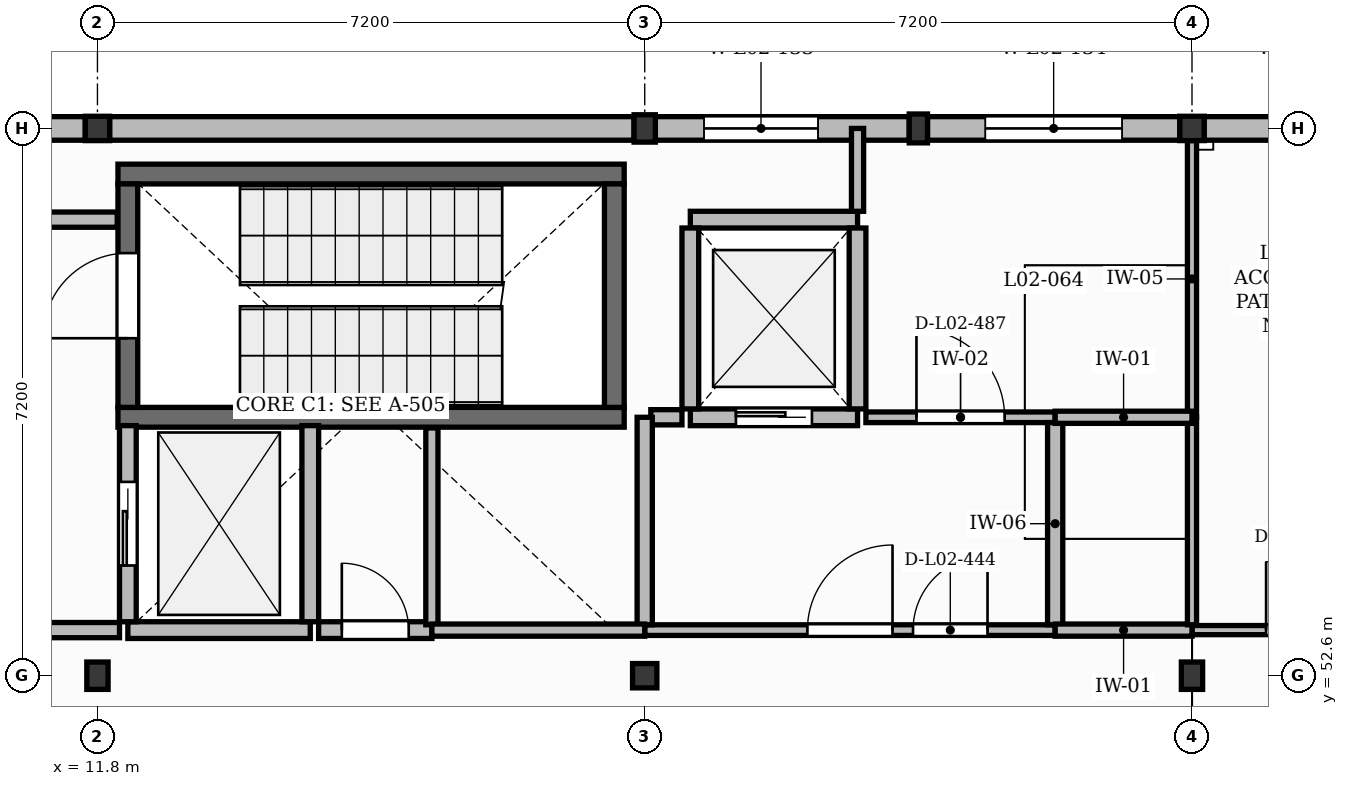
"""IFC4 building model, lengths in metres.
Left out: names, types, materials, properties, quantities, classifications, styles, units other than length and angle.
Written with IfcOpenShell. Run it as: python <this file> out.ifc"""

import sys

from ifc_helpers import new_model, si_unit, direction, frame, frame_2d, origin, origin_2d, place, context, subcontext, project, spatial, rectangle, extrude, element, fill, save


model = new_model("IFC4")
c1 = context("Model", 3, precision=1e-05, world=origin(), true_north=direction((0.0, 1.0)))
c2 = subcontext(c1, "Body", "Model", "MODEL_VIEW")
j1 = project(units=[si_unit("LENGTHUNIT", "METRE"), si_unit("PLANEANGLEUNIT", "RADIAN")], contexts=[c1])
p1 = place(None, origin())
s1 = spatial("IfcSite", under=j1, at=p1, CompositionType="ELEMENT")
p2 = place(p1, origin())
s2 = spatial("IfcBuilding", under=s1, at=p2, CompositionType="ELEMENT")
p3 = place(p2, frame((0.0, 0.0, 9.0)))
s3 = spatial("IfcBuildingStorey", under=s2, at=p3, CompositionType="ELEMENT", Elevation=9.0)
p4 = place(p3, frame((11.8, 52.6, 0.0), z_axis=(0.0, 0.0, 1.0), x_axis=(1.0, 0.0, 0.0)))
e1 = element("IfcColumn", 1, at=p4, inside=s3, PredefinedType="COLUMN", context=c2, shape_type="SweptSolid", body=[
    extrude(rectangle(XDim=0.28, YDim=0.36, at=origin_2d()), origin(), (0.0, 0.0, 1.0), 3.99),
])
for number, where, z_axis, x_axis in (
    (2, (11.8, 59.8, 0.0), (0.0, 0.0, 1.0), (1.0, 0.0, 0.0)),
    (3, (19.0, 52.6, 0.0), (0.0, 0.0, 1.0), (1.0, 0.0, 0.0)),
):
    element("IfcColumn", number, at=place(p3, frame(where, z_axis=z_axis, x_axis=x_axis)), inside=s3, PredefinedType="COLUMN", context=c2, shape_type="SweptSolid", body=[
        extrude(rectangle(XDim=0.32, YDim=0.32, at=origin_2d()), origin(), (0.0, 0.0, 1.0), 3.99),
    ])
for number, where, z_axis, x_axis in (
    (4, (19.0, 59.8, 0.0), (0.0, 0.0, 1.0), (1.0, 0.0, 0.0)),
    (5, (26.2, 52.6, 0.0), (0.0, 0.0, 1.0), (1.0, 0.0, 0.0)),
):
    element("IfcColumn", number, at=place(p3, frame(where, z_axis=z_axis, x_axis=x_axis)), inside=s3, PredefinedType="COLUMN", context=c2, shape_type="SweptSolid", body=[
        extrude(rectangle(XDim=0.28, YDim=0.36, at=origin_2d()), origin(), (0.0, 0.0, 1.0), 3.99),
    ])
p5 = place(p3, frame((26.2, 59.8, 0.0), z_axis=(0.0, 0.0, 1.0), x_axis=(1.0, 0.0, 0.0)))
e6 = element("IfcColumn", 6, at=p5, inside=s3, PredefinedType="COLUMN", context=c2, shape_type="SweptSolid", body=[
    extrude(rectangle(XDim=0.32, YDim=0.32, at=origin_2d()), origin(), (0.0, 0.0, 1.0), 3.99),
])
p6 = place(p3, frame((22.6, 59.8, 0.0), z_axis=(0.0, 0.0, 1.0), x_axis=(1.0, 0.0, 0.0)))
e7 = element("IfcColumn", 7, at=p6, inside=s3, PredefinedType="PILASTER", context=c2, shape_type="SweptSolid", body=[
    extrude(rectangle(XDim=0.24, YDim=0.38, at=origin_2d()), origin(), (0.0, 0.0, 1.0), 3.99),
])
p7 = place(p3, frame((8.32, 59.8, 0.0), z_axis=(0.0, 0.0, 1.0), x_axis=(1.0, 0.0, 0.0)))
e8 = element("IfcWall", 8, at=p7, inside=s3, PredefinedType="SOLIDWALL", context=c2, shape_type="SweptSolid", body=[
    extrude(rectangle(XDim=3.32, YDim=0.31, at=frame_2d((1.66, 0.0))), origin(), (0.0, 0.0, 1.0), 3.53),
])
p8 = place(p7, frame((1.12, 0.0, 1.0)))
e9 = element("IfcOpeningElement", 9, at=p8, cuts=e8, PredefinedType="OPENING", context=c2, shape_type="SweptSolid", body=[
    extrude(rectangle(XDim=1.08, YDim=1.95, at=frame_2d((0.54, 0.975))), frame((0.0, 0.165, 0.0), z_axis=(0.0, -1.0, 0.0), x_axis=(1.0, 0.0, 0.0)), (0.0, 0.0, 1.0), 0.33),
])
p9 = place(p3, frame((11.96, 59.8, 0.0), z_axis=(0.0, 0.0, 1.0), x_axis=(1.0, 0.0, 0.0)))
e10 = element("IfcWall", 10, at=p9, inside=s3, PredefinedType="SOLIDWALL", context=c2, shape_type="SweptSolid", body=[
    extrude(rectangle(XDim=6.9, YDim=0.31, at=frame_2d((3.45, 0.0))), origin(), (0.0, 0.0, 1.0), 3.53),
])
p10 = place(p3, frame((19.14, 59.8, 0.0), z_axis=(0.0, 0.0, 1.0), x_axis=(1.0, 0.0, 0.0)))
e11 = element("IfcWall", 11, at=p10, inside=s3, PredefinedType="SOLIDWALL", context=c2, shape_type="SweptSolid", body=[
    extrude(rectangle(XDim=3.34, YDim=0.31, at=frame_2d((1.67, 0.0))), origin(), (0.0, 0.0, 1.0), 3.53),
])
p11 = place(p10, frame((0.64, 0.0, 1.5)))
e12 = element("IfcOpeningElement", 12, at=p11, cuts=e11, PredefinedType="OPENING", context=c2, shape_type="SweptSolid", body=[
    extrude(rectangle(XDim=1.5, YDim=1.25, at=frame_2d((0.75, 0.625))), frame((0.0, 0.165, 0.0), z_axis=(0.0, -1.0, 0.0), x_axis=(1.0, 0.0, 0.0)), (0.0, 0.0, 1.0), 0.33),
])
p12 = place(p3, frame((22.72, 59.8, 0.0), z_axis=(0.0, 0.0, 1.0), x_axis=(1.0, 0.0, 0.0)))
e13 = element("IfcWall", 13, at=p12, inside=s3, PredefinedType="SOLIDWALL", context=c2, shape_type="SweptSolid", body=[
    extrude(rectangle(XDim=3.32, YDim=0.31, at=frame_2d((1.66, 0.0))), origin(), (0.0, 0.0, 1.0), 3.53),
])
p13 = place(p12, frame((0.76, 0.0, 1.0)))
e14 = element("IfcOpeningElement", 14, at=p13, cuts=e13, PredefinedType="OPENING", context=c2, shape_type="SweptSolid", body=[
    extrude(rectangle(XDim=1.8, YDim=1.8, at=frame_2d((0.9, 0.9))), frame((0.0, 0.165, 0.0), z_axis=(0.0, -1.0, 0.0), x_axis=(1.0, 0.0, 0.0)), (0.0, 0.0, 1.0), 0.33),
])
p14 = place(p3, frame((26.36, 59.8, 0.0), z_axis=(0.0, 0.0, 1.0), x_axis=(1.0, 0.0, 0.0)))
e15 = element("IfcWall", 15, at=p14, inside=s3, PredefinedType="SOLIDWALL", context=c2, shape_type="SweptSolid", body=[
    extrude(rectangle(XDim=6.9, YDim=0.31, at=frame_2d((3.45, 0.0))), origin(), (0.0, 0.0, 1.0), 3.53),
])
p15 = place(p14, frame((0.865, 0.0, 1.0)))
e16 = element("IfcOpeningElement", 16, at=p15, cuts=e15, PredefinedType="OPENING", context=c2, shape_type="SweptSolid", body=[
    extrude(rectangle(XDim=1.08, YDim=1.95, at=frame_2d((0.54, 0.975))), frame((0.0, 0.165, 0.0), z_axis=(0.0, -1.0, 0.0), x_axis=(1.0, 0.0, 0.0)), (0.0, 0.0, 1.0), 0.33),
])
p16 = place(p14, frame((4.115, 0.0, 1.0)))
e17 = element("IfcOpeningElement", 17, at=p16, cuts=e15, PredefinedType="OPENING", context=c2, shape_type="SweptSolid", body=[
    extrude(rectangle(XDim=1.24, YDim=1.8, at=frame_2d((0.62, 0.9))), frame((0.0, 0.165, 0.0), z_axis=(0.0, -1.0, 0.0), x_axis=(1.0, 0.0, 0.0)), (0.0, 0.0, 1.0), 0.33),
])
for number, where, z_axis, x_axis in (
    (18, (12.07, 56.0, 0.0), (0.0, 0.0, 1.0), (1.0, 0.0, 0.0)),
    (19, (12.07, 59.2, 0.0), (0.0, 0.0, 1.0), (1.0, 0.0, 0.0)),
):
    element("IfcWall", number, at=place(p3, frame(where, z_axis=z_axis, x_axis=x_axis)), inside=s3, PredefinedType="SHEAR", context=c2, shape_type="SweptSolid", body=[
        extrude(rectangle(XDim=6.66, YDim=0.26, at=frame_2d((3.33, 0.0))), origin(), (0.0, 0.0, 1.0), 3.95),
    ])
p17 = place(p3, frame((12.2, 56.13, 0.0), z_axis=(0.0, 0.0, 1.0), x_axis=(0.0, 1.0, 0.0)))
e20 = element("IfcWall", 20, at=p17, inside=s3, PredefinedType="SHEAR", context=c2, shape_type="SweptSolid", body=[
    extrude(rectangle(XDim=2.94, YDim=0.26, at=frame_2d((1.47, 0.0))), origin(), (0.0, 0.0, 1.0), 3.95),
])
p18 = place(p17, frame((0.91, 0.0, 0.0)))
e21 = element("IfcOpeningElement", 21, at=p18, cuts=e20, PredefinedType="OPENING", context=c2, shape_type="SweptSolid", body=[
    extrude(rectangle(XDim=1.12, YDim=2.1, at=frame_2d((0.56, 1.05))), frame((0.0, 0.14, 0.0), z_axis=(0.0, -1.0, 0.0), x_axis=(1.0, 0.0, 0.0)), (0.0, 0.0, 1.0), 0.28),
])
p19 = place(p3, frame((18.6, 56.13, 0.0), z_axis=(0.0, 0.0, 1.0), x_axis=(0.0, 1.0, 0.0)))
e22 = element("IfcWall", 22, at=p19, inside=s3, PredefinedType="SHEAR", context=c2, shape_type="SweptSolid", body=[
    extrude(rectangle(XDim=2.94, YDim=0.26, at=frame_2d((1.47, 0.0))), origin(), (0.0, 0.0, 1.0), 3.95),
])
p20 = place(p3, frame((12.2, 53.2, 0.0), z_axis=(0.0, 0.0, 1.0), x_axis=(1.0, 0.0, 0.0)))
e23 = element("IfcWall", 23, at=p20, inside=s3, PredefinedType="SOLIDWALL", context=c2, shape_type="SweptSolid", body=[
    extrude(rectangle(XDim=2.4, YDim=0.22, at=frame_2d((1.2, 0.0))), origin(), (0.0, 0.0, 1.0), 3.95),
])
p21 = place(p3, frame((12.2, 53.31, 0.0), z_axis=(0.0, 0.0, 1.0), x_axis=(0.0, 1.0, 0.0)))
e24 = element("IfcWall", 24, at=p21, inside=s3, PredefinedType="SOLIDWALL", context=c2, shape_type="SweptSolid", body=[
    extrude(rectangle(XDim=2.58, YDim=0.22, at=frame_2d((1.29, 0.0))), origin(), (0.0, 0.0, 1.0), 3.95),
])
p22 = place(p21, frame((0.74, 0.0, 0.0)))
e25 = element("IfcOpeningElement", 25, at=p22, cuts=e24, PredefinedType="OPENING", context=c2, shape_type="SweptSolid", body=[
    extrude(rectangle(XDim=1.1, YDim=2.15, at=frame_2d((0.55, 1.075))), frame((0.0, 0.12, 0.0), z_axis=(0.0, -1.0, 0.0), x_axis=(1.0, 0.0, 0.0)), (0.0, 0.0, 1.0), 0.24),
])
p23 = place(p3, frame((14.6, 53.31, 0.0), z_axis=(0.0, 0.0, 1.0), x_axis=(0.0, 1.0, 0.0)))
e26 = element("IfcWall", 26, at=p23, inside=s3, PredefinedType="SOLIDWALL", context=c2, shape_type="SweptSolid", body=[
    extrude(rectangle(XDim=2.58, YDim=0.22, at=frame_2d((1.29, 0.0))), origin(), (0.0, 0.0, 1.0), 3.95),
])
p24 = place(p3, frame((19.6, 56.0, 0.0), z_axis=(0.0, 0.0, 1.0), x_axis=(1.0, 0.0, 0.0)))
e27 = element("IfcWall", 27, at=p24, inside=s3, PredefinedType="SOLIDWALL", context=c2, shape_type="SweptSolid", body=[
    extrude(rectangle(XDim=2.2, YDim=0.22, at=frame_2d((1.1, 0.0))), origin(), (0.0, 0.0, 1.0), 3.95),
])
p25 = place(p24, frame((0.6, 0.0, 0.0)))
e28 = element("IfcOpeningElement", 28, at=p25, cuts=e27, PredefinedType="OPENING", context=c2, shape_type="SweptSolid", body=[
    extrude(rectangle(XDim=1.0, YDim=2.15, at=frame_2d((0.5, 1.075))), frame((0.0, 0.12, 0.0), z_axis=(0.0, -1.0, 0.0), x_axis=(1.0, 0.0, 0.0)), (0.0, 0.0, 1.0), 0.24),
])
p26 = place(p3, frame((19.6, 58.6, 0.0), z_axis=(0.0, 0.0, 1.0), x_axis=(1.0, 0.0, 0.0)))
e29 = element("IfcWall", 29, at=p26, inside=s3, PredefinedType="SOLIDWALL", context=c2, shape_type="SweptSolid", body=[
    extrude(rectangle(XDim=2.2, YDim=0.22, at=frame_2d((1.1, 0.0))), origin(), (0.0, 0.0, 1.0), 3.95),
])
for number, where, z_axis, x_axis in (
    (30, (19.6, 56.11, 0.0), (0.0, 0.0, 1.0), (0.0, 1.0, 0.0)),
    (31, (21.8, 56.11, 0.0), (0.0, 0.0, 1.0), (0.0, 1.0, 0.0)),
):
    element("IfcWall", number, at=place(p3, frame(where, z_axis=z_axis, x_axis=x_axis)), inside=s3, PredefinedType="SOLIDWALL", context=c2, shape_type="SweptSolid", body=[
        extrude(rectangle(XDim=2.38, YDim=0.22, at=frame_2d((1.19, 0.0))), origin(), (0.0, 0.0, 1.0), 3.95),
    ])
p27 = place(p3, frame((7.8, 53.2, 0.0), z_axis=(0.0, 0.0, 1.0), x_axis=(1.0, 0.0, 0.0)))
e32 = element("IfcWall", 32, at=p27, inside=s3, PredefinedType="PARTITIONING", context=c2, shape_type="SweptSolid", body=[
    extrude(rectangle(XDim=4.29, YDim=0.2, at=frame_2d((2.145, 0.0))), origin(), (0.0, 0.0, 1.0), 3.96),
])
p28 = place(p27, frame((1.405, 0.0, 0.0)))
e33 = element("IfcOpeningElement", 33, at=p28, cuts=e32, PredefinedType="OPENING", context=c2, shape_type="SweptSolid", body=[
    extrude(rectangle(XDim=1.48, YDim=2.25, at=frame_2d((0.74, 1.125))), frame((0.0, 0.11, 0.0), z_axis=(0.0, -1.0, 0.0), x_axis=(1.0, 0.0, 0.0)), (0.0, 0.0, 1.0), 0.22),
])
p29 = place(p3, frame((14.71, 53.2, 0.0), z_axis=(0.0, 0.0, 1.0), x_axis=(1.0, 0.0, 0.0)))
e34 = element("IfcWall", 34, at=p29, inside=s3, PredefinedType="SOLIDWALL", context=c2, shape_type="SweptSolid", body=[
    extrude(rectangle(XDim=1.49, YDim=0.22, at=frame_2d((0.745, 0.0))), origin(), (0.0, 0.0, 1.0), 3.96),
])
p30 = place(p29, frame((0.305, 0.0, 0.0)))
e35 = element("IfcOpeningElement", 35, at=p30, cuts=e34, PredefinedType="OPENING", context=c2, shape_type="SweptSolid", body=[
    extrude(rectangle(XDim=0.88, YDim=2.05, at=frame_2d((0.44, 1.025))), frame((0.0, 0.12, 0.0), z_axis=(0.0, -1.0, 0.0), x_axis=(1.0, 0.0, 0.0)), (0.0, 0.0, 1.0), 0.24),
])
p31 = place(p3, frame((19.0, 53.2, 0.0), z_axis=(0.0, 0.0, 1.0), x_axis=(1.0, 0.0, 0.0)))
e36 = element("IfcWall", 36, at=p31, inside=s3, PredefinedType="PARTITIONING", context=c2, shape_type="SweptSolid", body=[
    extrude(rectangle(XDim=5.4, YDim=0.14, at=frame_2d((2.7, 0.0))), origin(), (0.0, 0.0, 1.0), 3.96),
])
p32 = place(p31, frame((2.14, 0.0, 0.0)))
e37 = element("IfcOpeningElement", 37, at=p32, cuts=e36, PredefinedType="OPENING", context=c2, shape_type="SweptSolid", body=[
    extrude(rectangle(XDim=1.12, YDim=2.15, at=frame_2d((0.56, 1.075))), frame((0.0, 0.08, 0.0), z_axis=(0.0, -1.0, 0.0), x_axis=(1.0, 0.0, 0.0)), (0.0, 0.0, 1.0), 0.16),
])
p33 = place(p31, frame((3.53, 0.0, 0.0)))
e38 = element("IfcOpeningElement", 38, at=p33, cuts=e36, PredefinedType="OPENING", context=c2, shape_type="SweptSolid", body=[
    extrude(rectangle(XDim=0.98, YDim=2.15, at=frame_2d((0.49, 1.075))), frame((0.0, 0.08, 0.0), z_axis=(0.0, -1.0, 0.0), x_axis=(1.0, 0.0, 0.0)), (0.0, 0.0, 1.0), 0.16),
])
p34 = place(p3, frame((21.91, 56.0, 0.0), z_axis=(0.0, 0.0, 1.0), x_axis=(1.0, 0.0, 0.0)))
e39 = element("IfcWall", 39, at=p34, inside=s3, PredefinedType="PARTITIONING", context=c2, shape_type="SweptSolid", body=[
    extrude(rectangle(XDim=2.49, YDim=0.14, at=frame_2d((1.245, 0.0))), origin(), (0.0, 0.0, 1.0), 3.96),
])
p35 = place(p34, frame((0.665, 0.0, 0.0)))
e40 = element("IfcOpeningElement", 40, at=p35, cuts=e39, PredefinedType="OPENING", context=c2, shape_type="SweptSolid", body=[
    extrude(rectangle(XDim=1.16, YDim=2.1, at=frame_2d((0.58, 1.05))), frame((0.0, 0.08, 0.0), z_axis=(0.0, -1.0, 0.0), x_axis=(1.0, 0.0, 0.0)), (0.0, 0.0, 1.0), 0.16),
])
p36 = place(p3, frame((26.2, 53.2, 0.0), z_axis=(0.0, 0.0, 1.0), x_axis=(1.0, 0.0, 0.0)))
e41 = element("IfcWall", 41, at=p36, inside=s3, PredefinedType="PLUMBINGWALL", context=c2, shape_type="SweptSolid", body=[
    extrude(rectangle(XDim=2.85, YDim=0.12, at=frame_2d((1.425, 0.0))), origin(), (0.0, 0.0, 1.0), 3.96),
])
p37 = place(p36, frame((0.975, 0.0, 0.0)))
e42 = element("IfcOpeningElement", 42, at=p37, cuts=e41, PredefinedType="OPENING", context=c2, shape_type="SweptSolid", body=[
    extrude(rectangle(XDim=0.9, YDim=2.1, at=frame_2d((0.45, 1.05))), frame((0.0, 0.07, 0.0), z_axis=(0.0, -1.0, 0.0), x_axis=(1.0, 0.0, 0.0)), (0.0, 0.0, 1.0), 0.14),
])
p38 = place(p3, frame((26.2, 56.0, 0.0), z_axis=(0.0, 0.0, 1.0), x_axis=(0.0, 1.0, 0.0)))
e43 = element("IfcWall", 43, at=p38, inside=s3, PredefinedType="PLUMBINGWALL", context=c2, shape_type="SweptSolid", body=[
    extrude(rectangle(XDim=3.64, YDim=0.12, at=frame_2d((1.82, 0.0))), origin(), (0.0, 0.0, 1.0), 3.47),
])
p39 = place(p3, frame((16.2, 53.27, 0.0), z_axis=(0.0, 0.0, 1.0), x_axis=(0.0, 1.0, 0.0)))
e44 = element("IfcWall", 44, at=p39, inside=s3, PredefinedType="PARTITIONING", context=c2, shape_type="SweptSolid", body=[
    extrude(rectangle(XDim=2.59, YDim=0.16, at=frame_2d((1.295, 0.0))), origin(), (0.0, 0.0, 1.0), 3.96),
])
p40 = place(p3, frame((12.06, 58.6, 0.0), z_axis=(0.0, 0.0, 1.0), x_axis=(-1.0, 0.0, 0.0)))
e45 = element("IfcWall", 45, at=p40, inside=s3, PredefinedType="PARTITIONING", context=c2, shape_type="SweptSolid", body=[
    extrude(rectangle(XDim=4.26, YDim=0.2, at=frame_2d((2.13, 0.0))), origin(), (0.0, 0.0, 1.0), 3.96),
])
p41 = place(p3, frame((24.4, 53.27, 0.0), z_axis=(0.0, 0.0, 1.0), x_axis=(0.0, 1.0, 0.0)))
e46 = element("IfcWall", 46, at=p41, inside=s3, PredefinedType="PARTITIONING", context=c2, shape_type="SweptSolid", body=[
    extrude(rectangle(XDim=2.66, YDim=0.2, at=frame_2d((1.33, 0.0))), origin(), (0.0, 0.0, 1.0), 3.96),
])
p42 = place(p3, frame((19.49, 56.0, 0.0), z_axis=(0.0, 0.0, 1.0), x_axis=(-1.0, 0.0, 0.0)))
e47 = element("IfcWall", 47, at=p42, inside=s3, PredefinedType="PARTITIONING", context=c2, shape_type="SweptSolid", body=[
    extrude(rectangle(XDim=0.41, YDim=0.2, at=frame_2d((0.205, 0.0))), origin(), (0.0, 0.0, 1.0), 3.96),
])
p43 = place(p3, frame((19.0, 53.27, 0.0), z_axis=(0.0, 0.0, 1.0), x_axis=(0.0, 1.0, 0.0)))
e48 = element("IfcWall", 48, at=p43, inside=s3, PredefinedType="PARTITIONING", context=c2, shape_type="SweptSolid", body=[
    extrude(rectangle(XDim=2.73, YDim=0.2, at=frame_2d((1.365, 0.0))), origin(), (0.0, 0.0, 1.0), 3.47),
])
p44 = place(p3, frame((26.2, 53.2, 0.0), z_axis=(0.0, 0.0, 1.0), x_axis=(-1.0, 0.0, 0.0)))
e49 = element("IfcWall", 49, at=p44, inside=s3, PredefinedType="PARTITIONING", context=c2, shape_type="SweptSolid", body=[
    extrude(rectangle(XDim=1.8, YDim=0.16, at=frame_2d((0.9, 0.0))), origin(), (0.0, 0.0, 1.0), 3.96),
])
p45 = place(p3, frame((19.0, 53.2, 0.0), z_axis=(0.0, 0.0, 1.0), x_axis=(-1.0, 0.0, 0.0)))
e50 = element("IfcWall", 50, at=p45, inside=s3, PredefinedType="PARTITIONING", context=c2, shape_type="SweptSolid", body=[
    extrude(rectangle(XDim=2.8, YDim=0.16, at=frame_2d((1.4, 0.0))), origin(), (0.0, 0.0, 1.0), 3.96),
])
p46 = place(p3, frame((26.2, 53.27, 0.0), z_axis=(0.0, 0.0, 1.0), x_axis=(0.0, 1.0, 0.0)))
e51 = element("IfcWall", 51, at=p46, inside=s3, PredefinedType="PLUMBINGWALL", context=c2, shape_type="SweptSolid", body=[
    extrude(rectangle(XDim=2.73, YDim=0.12, at=frame_2d((1.365, 0.0))), origin(), (0.0, 0.0, 1.0), 3.47),
])
p47 = place(p3, frame((24.4, 56.0, 0.0), z_axis=(0.0, 0.0, 1.0), x_axis=(1.0, 0.0, 0.0)))
e52 = element("IfcWall", 52, at=p47, inside=s3, PredefinedType="PARTITIONING", context=c2, shape_type="SweptSolid", body=[
    extrude(rectangle(XDim=1.8, YDim=0.16, at=frame_2d((0.9, 0.0))), origin(), (0.0, 0.0, 1.0), 3.96),
])
p48 = place(p3, frame((21.8, 58.71, 0.0), z_axis=(0.0, 0.0, 1.0), x_axis=(0.0, 1.0, 0.0)))
e53 = element("IfcWall", 53, at=p48, inside=s3, PredefinedType="PARTITIONING", context=c2, shape_type="SweptSolid", body=[
    extrude(rectangle(XDim=1.09, YDim=0.16, at=frame_2d((0.545, 0.0))), origin(), (0.0, 0.0, 1.0), 3.96),
])
p49 = place(p11, origin())
e54 = element("IfcWindow", 54, at=p49, inside=s3, PartitioningType="DOUBLE_PANEL_VERTICAL", PredefinedType="WINDOW", context=c2, shape_type="SweptSolid", body=[
    extrude(rectangle(XDim=1.5, YDim=1.25, at=frame_2d((0.75, 0.625))), frame((0.0, 0.03, 0.0), z_axis=(0.0, -1.0, 0.0), x_axis=(1.0, 0.0, 0.0)), (0.0, 0.0, 1.0), 0.06),
])
fill(e12, e54)
p50 = place(p13, origin())
e55 = element("IfcWindow", 55, at=p50, inside=s3, PartitioningType="DOUBLE_PANEL_VERTICAL", PredefinedType="WINDOW", context=c2, shape_type="SweptSolid", body=[
    extrude(rectangle(XDim=1.8, YDim=1.8, at=frame_2d((0.9, 0.9))), frame((0.0, 0.03, 0.0), z_axis=(0.0, -1.0, 0.0), x_axis=(1.0, 0.0, 0.0)), (0.0, 0.0, 1.0), 0.06),
])
fill(e14, e55)
p51 = place(p22, origin())
e56 = element("IfcDoor", 56, at=p51, inside=s3, OperationType="SLIDING_TO_LEFT", PredefinedType="DOOR", context=c2, shape_type="SweptSolid", body=[
    extrude(rectangle(XDim=1.1, YDim=2.15, at=frame_2d((0.55, 1.075))), frame((0.0, 0.025, 0.0), z_axis=(0.0, -1.0, 0.0), x_axis=(1.0, 0.0, 0.0)), (0.0, 0.0, 1.0), 0.05),
])
fill(e25, e56)
p52 = place(p25, origin())
e57 = element("IfcDoor", 57, at=p52, inside=s3, OperationType="SLIDING_TO_LEFT", PredefinedType="DOOR", context=c2, shape_type="SweptSolid", body=[
    extrude(rectangle(XDim=1.0, YDim=2.15, at=frame_2d((0.5, 1.075))), frame((0.0, 0.025, 0.0), z_axis=(0.0, -1.0, 0.0), x_axis=(1.0, 0.0, 0.0)), (0.0, 0.0, 1.0), 0.05),
])
fill(e28, e57)
p53 = place(p18, origin())
e58 = element("IfcDoor", 58, at=p53, inside=s3, OperationType="SINGLE_SWING_LEFT", PredefinedType="DOOR", context=c2, shape_type="SweptSolid", body=[
    extrude(rectangle(XDim=1.12, YDim=2.1, at=frame_2d((0.56, 1.05))), frame((0.0, 0.025, 0.0), z_axis=(0.0, -1.0, 0.0), x_axis=(1.0, 0.0, 0.0)), (0.0, 0.0, 1.0), 0.05),
])
fill(e21, e58)
p54 = place(p32, origin())
e59 = element("IfcDoor", 59, at=p54, inside=s3, OperationType="SINGLE_SWING_RIGHT", PredefinedType="DOOR", context=c2, shape_type="SweptSolid", body=[
    extrude(rectangle(XDim=1.12, YDim=2.15, at=frame_2d((0.56, 1.075))), frame((0.0, 0.025, 0.0), z_axis=(0.0, -1.0, 0.0), x_axis=(1.0, 0.0, 0.0)), (0.0, 0.0, 1.0), 0.05),
])
fill(e37, e59)
p55 = place(p33, origin())
e60 = element("IfcDoor", 60, at=p55, inside=s3, OperationType="SINGLE_SWING_RIGHT", PredefinedType="DOOR", context=c2, shape_type="SweptSolid", body=[
    extrude(rectangle(XDim=0.98, YDim=2.15, at=frame_2d((0.49, 1.075))), frame((0.0, 0.025, 0.0), z_axis=(0.0, -1.0, 0.0), x_axis=(1.0, 0.0, 0.0)), (0.0, 0.0, 1.0), 0.05),
])
fill(e38, e60)
p56 = place(p30, origin())
e61 = element("IfcDoor", 61, at=p56, inside=s3, OperationType="SINGLE_SWING_LEFT", PredefinedType="DOOR", context=c2, shape_type="SweptSolid", body=[
    extrude(rectangle(XDim=0.88, YDim=2.05, at=frame_2d((0.44, 1.025))), frame((0.0, 0.025, 0.0), z_axis=(0.0, -1.0, 0.0), x_axis=(1.0, 0.0, 0.0)), (0.0, 0.0, 1.0), 0.05),
])
fill(e35, e61)
p57 = place(p37, origin())
e62 = element("IfcDoor", 62, at=p57, inside=s3, OperationType="SINGLE_SWING_LEFT", PredefinedType="DOOR", context=c2, shape_type="SweptSolid", body=[
    extrude(rectangle(XDim=0.9, YDim=2.1, at=frame_2d((0.45, 1.05))), frame((0.0, 0.025, 0.0), z_axis=(0.0, -1.0, 0.0), x_axis=(1.0, 0.0, 0.0)), (0.0, 0.0, 1.0), 0.05),
])
fill(e42, e62)
p58 = place(p35, origin())
e63 = element("IfcDoor", 63, at=p58, inside=s3, OperationType="SINGLE_SWING_LEFT", PredefinedType="DOOR", context=c2, shape_type="SweptSolid", body=[
    extrude(rectangle(XDim=1.16, YDim=2.1, at=frame_2d((0.58, 1.05))), frame((0.0, 0.025, 0.0), z_axis=(0.0, -1.0, 0.0), x_axis=(1.0, 0.0, 0.0)), (0.0, 0.0, 1.0), 0.05),
])
fill(e40, e63)
save(model, sys.argv[1])
